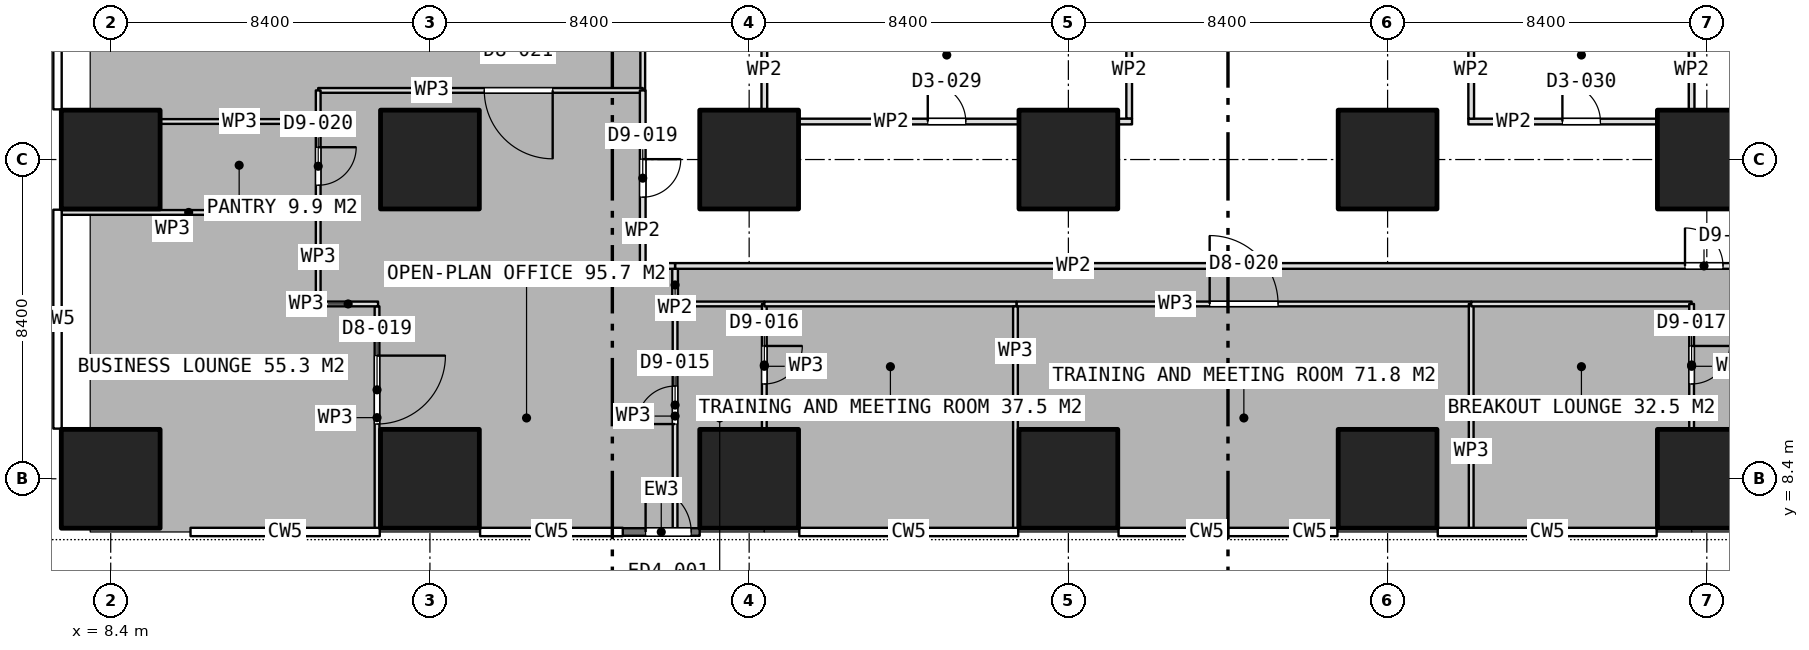
"""IFC4 building model, lengths in metres.
Left out: names, types, materials, properties, quantities, classifications, styles, units other than length and angle.
Written with IfcOpenShell. Run it as: python <this file> out.ifc"""

import sys

from ifc_helpers import new_model, si_unit, direction, frame, frame_2d, origin, origin_2d, place, context, subcontext, project, spatial, rectangle, extrude, element, fill, save


model = new_model("IFC4")
c1 = context("Model", 3, precision=1e-05, world=origin(), true_north=direction((0.0, 1.0)))
c2 = subcontext(c1, "Body", "Model", "MODEL_VIEW")
j1 = project(units=[si_unit("LENGTHUNIT", "METRE"), si_unit("PLANEANGLEUNIT", "RADIAN")], contexts=[c1])
p1 = place(None, origin())
s1 = spatial("IfcSite", under=j1, at=p1, CompositionType="ELEMENT")
p2 = place(p1, origin())
s2 = spatial("IfcBuilding", under=s1, at=p2, CompositionType="ELEMENT")
p3 = place(p2, frame((0.0, 0.0, 25.4)))
s3 = spatial("IfcBuildingStorey", under=s2, at=p3, CompositionType="ELEMENT", Elevation=25.4)
for number, where, z_axis, x_axis in (
    (1, (8.4, 8.4, 0.0), (0.0, 0.0, 1.0), (1.0, 0.0, 0.0)),
    (2, (8.4, 16.8, 0.0), (0.0, 0.0, 1.0), (1.0, 0.0, 0.0)),
    (3, (16.8, 8.4, 0.0), (0.0, 0.0, 1.0), (1.0, 0.0, 0.0)),
    (4, (16.8, 16.8, 0.0), (0.0, 0.0, 1.0), (1.0, 0.0, 0.0)),
    (5, (25.2, 8.4, 0.0), (0.0, 0.0, 1.0), (1.0, 0.0, 0.0)),
    (6, (25.2, 16.8, 0.0), (0.0, 0.0, 1.0), (1.0, 0.0, 0.0)),
    (7, (33.6, 8.4, 0.0), (0.0, 0.0, 1.0), (1.0, 0.0, 0.0)),
    (8, (33.6, 16.8, 0.0), (0.0, 0.0, 1.0), (1.0, 0.0, 0.0)),
    (9, (42.0, 8.4, 0.0), (0.0, 0.0, 1.0), (1.0, 0.0, 0.0)),
    (10, (42.0, 16.8, 0.0), (0.0, 0.0, 1.0), (1.0, 0.0, 0.0)),
    (11, (50.4, 8.4, 0.0), (0.0, 0.0, 1.0), (1.0, 0.0, 0.0)),
    (12, (50.4, 16.8, 0.0), (0.0, 0.0, 1.0), (1.0, 0.0, 0.0)),
):
    element("IfcColumn", number, at=place(p3, frame(where, z_axis=z_axis, x_axis=x_axis)), inside=s3, PredefinedType="COLUMN", context=c2, shape_type="SweptSolid", body=[
        extrude(rectangle(XDim=2.6, YDim=2.6, at=origin_2d()), origin(), (0.0, 0.0, 1.0), 3.75),
    ])
p4 = place(p3, frame((21.875, 7.0, 0.0), z_axis=(0.0, 0.0, 1.0), x_axis=(1.0, 0.0, 0.0)))
e13 = element("IfcWall", 13, at=p4, inside=s3, PredefinedType="SOLIDWALL", context=c2, shape_type="SweptSolid", body=[
    extrude(rectangle(XDim=2.024, YDim=0.2, at=frame_2d((1.012, 0.0))), origin(), (0.0, 0.0, 1.0), 3.5),
])
p5 = place(p4, frame((0.6, 0.0, 0.0)))
e14 = element("IfcOpeningElement", 14, at=p5, cuts=e13, PredefinedType="OPENING", context=c2, shape_type="SweptSolid", body=[
    extrude(rectangle(XDim=1.2, YDim=2.4, at=frame_2d((0.6, 1.2))), frame((0.0, 0.11, 0.0), z_axis=(0.0, -1.0, 0.0), x_axis=(1.0, 0.0, 0.0)), (0.0, 0.0, 1.0), 0.22),
])
p6 = place(p3, frame((25.525, 17.8, 0.0), z_axis=(0.0, 0.0, 1.0), x_axis=(1.0, 0.0, 0.0)))
e15 = element("IfcWall", 15, at=p6, inside=s3, PredefinedType="PARTITIONING", context=c2, shape_type="SweptSolid", body=[
    extrude(rectangle(XDim=9.75, YDim=0.15, at=frame_2d((4.875, 0.0))), origin(), (0.0, 0.0, 1.0), 3.5),
])
p7 = place(p6, frame((4.375, 0.0, 0.0)))
e16 = element("IfcOpeningElement", 16, at=p7, cuts=e15, PredefinedType="OPENING", context=c2, shape_type="SweptSolid", body=[
    extrude(rectangle(XDim=1.0, YDim=2.1, at=frame_2d((0.5, 1.05))), frame((0.0, 0.085, 0.0), z_axis=(0.0, -1.0, 0.0), x_axis=(1.0, 0.0, 0.0)), (0.0, 0.0, 1.0), 0.17),
])
for number, where, z_axis, x_axis in (
    (17, (25.6, 17.875, 0.0), (0.0, 0.0, 1.0), (0.0, 1.0, 0.0)),
    (18, (35.2, 17.875, 0.0), (0.0, 0.0, 1.0), (0.0, 1.0, 0.0)),
):
    element("IfcWall", number, at=place(p3, frame(where, z_axis=z_axis, x_axis=x_axis)), inside=s3, PredefinedType="PARTITIONING", context=c2, shape_type="SweptSolid", body=[
        extrude(rectangle(XDim=2.575, YDim=0.15, at=frame_2d((1.288, 0.0))), origin(), (0.0, 0.0, 1.0), 3.5),
    ])
p8 = place(p3, frame((44.125, 17.8, 0.0), z_axis=(0.0, 0.0, 1.0), x_axis=(1.0, 0.0, 0.0)))
e19 = element("IfcWall", 19, at=p8, inside=s3, PredefinedType="PARTITIONING", context=c2, shape_type="SweptSolid", body=[
    extrude(rectangle(XDim=5.95, YDim=0.15, at=frame_2d((2.975, 0.0))), origin(), (0.0, 0.0, 1.0), 3.5),
])
p9 = place(p8, frame((2.475, 0.0, 0.0)))
e20 = element("IfcOpeningElement", 20, at=p9, cuts=e19, PredefinedType="OPENING", context=c2, shape_type="SweptSolid", body=[
    extrude(rectangle(XDim=1.0, YDim=2.1, at=frame_2d((0.5, 1.05))), frame((0.0, 0.085, 0.0), z_axis=(0.0, -1.0, 0.0), x_axis=(1.0, 0.0, 0.0)), (0.0, 0.0, 1.0), 0.17),
])
for number, where, z_axis, x_axis in (
    (21, (44.2, 17.875, 0.0), (0.0, 0.0, 1.0), (0.0, 1.0, 0.0)),
    (22, (50.0, 17.875, 0.0), (0.0, 0.0, 1.0), (0.0, 1.0, 0.0)),
):
    element("IfcWall", number, at=place(p3, frame(where, z_axis=z_axis, x_axis=x_axis)), inside=s3, PredefinedType="PARTITIONING", context=c2, shape_type="SweptSolid", body=[
        extrude(rectangle(XDim=2.575, YDim=0.15, at=frame_2d((1.288, 0.0))), origin(), (0.0, 0.0, 1.0), 3.5),
    ])
p10 = place(p3, frame((32.236, 13.0, 0.0), z_axis=(0.0, 0.0, 1.0), x_axis=(1.0, 0.0, 0.0)))
e23 = element("IfcWall", 23, at=p10, inside=s3, PredefinedType="PARTITIONING", context=c2, shape_type="SweptSolid", body=[
    extrude(rectangle(XDim=11.964, YDim=0.125, at=frame_2d((5.982, 0.0))), origin(), (0.0, 0.0, 1.0), 3.5),
])
p11 = place(p10, frame((5.082, 0.0, 0.0)))
e24 = element("IfcOpeningElement", 24, at=p11, cuts=e23, PredefinedType="OPENING", context=c2, shape_type="SweptSolid", body=[
    extrude(rectangle(XDim=1.8, YDim=2.1, at=frame_2d((0.9, 1.05))), frame((0.0, 0.073, 0.0), z_axis=(0.0, -1.0, 0.0), x_axis=(1.0, 0.0, 0.0)), (0.0, 0.0, 1.0), 0.145),
])
p12 = place(p3, frame((44.2, 13.0, 0.0), z_axis=(0.0, 0.0, 1.0), x_axis=(0.0, -1.0, 0.0)))
e25 = element("IfcWall", 25, at=p12, inside=s3, PredefinedType="PARTITIONING", context=c2, shape_type="SweptSolid", body=[
    extrude(rectangle(XDim=5.95, YDim=0.125, at=frame_2d((2.975, 0.0))), origin(), (0.0, 0.0, 1.0), 3.5),
])
p13 = place(p3, frame((32.208, 7.08, 0.0), z_axis=(0.0, 0.0, 1.0), x_axis=(0.0, 1.0, 0.0)))
e26 = element("IfcWall", 26, at=p13, inside=s3, PredefinedType="PARTITIONING", context=c2, shape_type="SweptSolid", body=[
    extrude(rectangle(XDim=5.858, YDim=0.125, at=frame_2d((2.929, 0.0))), origin(), (0.0, 0.0, 1.0), 3.5),
])
p14 = place(p3, frame((44.201, 13.0, 0.0), z_axis=(0.0, 0.0, 1.0), x_axis=(1.0, 0.0, 0.0)))
e27 = element("IfcWall", 27, at=p14, inside=s3, PredefinedType="PARTITIONING", context=c2, shape_type="SweptSolid", body=[
    extrude(rectangle(XDim=5.799, YDim=0.125, at=frame_2d((2.899, 0.0))), origin(), (0.0, 0.0, 1.0), 3.5),
])
p15 = place(p3, frame((50.0, 13.0, 0.0), z_axis=(0.0, 0.0, 1.0), x_axis=(0.0, -1.0, 0.0)))
e28 = element("IfcWall", 28, at=p15, inside=s3, PredefinedType="PARTITIONING", context=c2, shape_type="SweptSolid", body=[
    extrude(rectangle(XDim=3.28, YDim=0.125, at=frame_2d((1.64, 0.0))), origin(), (0.0, 0.0, 1.0), 3.5),
])
p16 = place(p15, frame((1.105, 0.0, 0.0)))
e29 = element("IfcOpeningElement", 29, at=p16, cuts=e28, PredefinedType="OPENING", context=c2, shape_type="SweptSolid", body=[
    extrude(rectangle(XDim=1.0, YDim=2.1, at=frame_2d((0.5, 1.05))), frame((0.0, 0.073, 0.0), z_axis=(0.0, -1.0, 0.0), x_axis=(1.0, 0.0, 0.0)), (0.0, 0.0, 1.0), 0.145),
])
p17 = place(p3, frame((23.251, 13.0, 0.0), z_axis=(0.0, 0.0, 1.0), x_axis=(1.0, 0.0, 0.0)))
e30 = element("IfcWall", 30, at=p17, inside=s3, PredefinedType="PARTITIONING", context=c2, shape_type="SweptSolid", body=[
    extrude(rectangle(XDim=2.348, YDim=0.125, at=frame_2d((1.174, 0.0))), origin(), (0.0, 0.0, 1.0), 3.5),
])
p18 = place(p3, frame((25.599, 13.0, 0.0), z_axis=(0.0, 0.0, 1.0), x_axis=(0.0, -1.0, 0.0)))
e31 = element("IfcWall", 31, at=p18, inside=s3, PredefinedType="PARTITIONING", context=c2, shape_type="SweptSolid", body=[
    extrude(rectangle(XDim=3.28, YDim=0.125, at=frame_2d((1.64, 0.0))), origin(), (0.0, 0.0, 1.0), 3.5),
])
p19 = place(p18, frame((1.105, 0.0, 0.0)))
e32 = element("IfcOpeningElement", 32, at=p19, cuts=e31, PredefinedType="OPENING", context=c2, shape_type="SweptSolid", body=[
    extrude(rectangle(XDim=1.0, YDim=2.1, at=frame_2d((0.5, 1.05))), frame((0.0, 0.073, 0.0), z_axis=(0.0, -1.0, 0.0), x_axis=(1.0, 0.0, 0.0)), (0.0, 0.0, 1.0), 0.145),
])
p20 = place(p3, frame((23.251, 7.1, 0.0), z_axis=(0.0, 0.0, 1.0), x_axis=(0.0, 1.0, 0.0)))
e33 = element("IfcWall", 33, at=p20, inside=s3, PredefinedType="PARTITIONING", context=c2, shape_type="SweptSolid", body=[
    extrude(rectangle(XDim=5.9, YDim=0.125, at=frame_2d((2.95, 0.0))), origin(), (0.0, 0.0, 1.0), 3.5),
])
p21 = place(p20, frame((2.74, 0.0, 0.0)))
e34 = element("IfcOpeningElement", 34, at=p21, cuts=e33, PredefinedType="OPENING", context=c2, shape_type="SweptSolid", body=[
    extrude(rectangle(XDim=1.0, YDim=2.1, at=frame_2d((0.5, 1.05))), frame((0.0, 0.073, 0.0), z_axis=(0.0, -1.0, 0.0), x_axis=(1.0, 0.0, 0.0)), (0.0, 0.0, 1.0), 0.145),
])
p22 = place(p3, frame((25.6, 13.0, 0.0), z_axis=(0.0, 0.0, 1.0), x_axis=(1.0, 0.0, 0.0)))
e35 = element("IfcWall", 35, at=p22, inside=s3, PredefinedType="PARTITIONING", context=c2, shape_type="SweptSolid", body=[
    extrude(rectangle(XDim=6.634, YDim=0.125, at=frame_2d((3.317, 0.0))), origin(), (0.0, 0.0, 1.0), 3.5),
])
p23 = place(p3, frame((23.251, 13.0, 0.0), z_axis=(0.0, 0.0, 1.0), x_axis=(0.0, 1.0, 0.0)))
e36 = element("IfcWall", 36, at=p23, inside=s3, PredefinedType="PARTITIONING", context=c2, shape_type="SweptSolid", body=[
    extrude(rectangle(XDim=1.0, YDim=0.15, at=frame_2d((0.5, 0.0))), origin(), (0.0, 0.0, 1.0), 3.5),
])
p24 = place(p3, frame((23.251, 14.0, 0.0), z_axis=(0.0, 0.0, 1.0), x_axis=(1.0, 0.0, 0.0)))
e37 = element("IfcWall", 37, at=p24, inside=s3, PredefinedType="PARTITIONING", context=c2, shape_type="SweptSolid", body=[
    extrude(rectangle(XDim=29.949, YDim=0.15, at=frame_2d((14.975, 0.0))), origin(), (0.0, 0.0, 1.0), 3.5),
])
p25 = place(p24, frame((26.575, 0.0, 0.0)))
e38 = element("IfcOpeningElement", 38, at=p25, cuts=e37, PredefinedType="OPENING", context=c2, shape_type="SweptSolid", body=[
    extrude(rectangle(XDim=1.0, YDim=2.1, at=frame_2d((0.5, 1.05))), frame((0.0, 0.085, 0.0), z_axis=(0.0, -1.0, 0.0), x_axis=(1.0, 0.0, 0.0)), (0.0, 0.0, 1.0), 0.17),
])
p26 = place(p3, frame((13.86, 17.801, 0.0), z_axis=(0.0, 0.0, 1.0), x_axis=(-1.0, 0.0, 0.0)))
e39 = element("IfcWall", 39, at=p26, inside=s3, PredefinedType="PARTITIONING", context=c2, shape_type="SweptSolid", body=[
    extrude(rectangle(XDim=4.14, YDim=0.125, at=frame_2d((2.07, 0.0))), origin(), (0.0, 0.0, 1.0), 3.5),
])
p27 = place(p3, frame((22.4, 28.189, 0.0), z_axis=(0.0, 0.0, 1.0), x_axis=(0.0, -1.0, 0.0)))
e40 = element("IfcWall", 40, at=p27, inside=s3, PredefinedType="PARTITIONING", context=c2, shape_type="SweptSolid", body=[
    extrude(rectangle(XDim=9.57, YDim=0.125, at=frame_2d((4.785, 0.0))), origin(), (0.0, 0.0, 1.0), 3.5),
])
p28 = place(p3, frame((22.4, 18.619, 0.0), z_axis=(0.0, 0.0, 1.0), x_axis=(-1.0, 0.0, 0.0)))
e41 = element("IfcWall", 41, at=p28, inside=s3, PredefinedType="PARTITIONING", context=c2, shape_type="SweptSolid", body=[
    extrude(rectangle(XDim=8.54, YDim=0.125, at=frame_2d((4.27, 0.0))), origin(), (0.0, 0.0, 1.0), 3.5),
])
p29 = place(p28, frame((2.37, 0.0, 0.0)))
e42 = element("IfcOpeningElement", 42, at=p29, cuts=e41, PredefinedType="OPENING", context=c2, shape_type="SweptSolid", body=[
    extrude(rectangle(XDim=1.8, YDim=2.1, at=frame_2d((0.9, 1.05))), frame((0.0, 0.073, 0.0), z_axis=(0.0, -1.0, 0.0), x_axis=(1.0, 0.0, 0.0)), (0.0, 0.0, 1.0), 0.145),
])
p30 = place(p3, frame((13.86, 18.619, 0.0), z_axis=(0.0, 0.0, 1.0), x_axis=(0.0, -1.0, 0.0)))
e43 = element("IfcWall", 43, at=p30, inside=s3, PredefinedType="PARTITIONING", context=c2, shape_type="SweptSolid", body=[
    extrude(rectangle(XDim=0.818, YDim=0.125, at=frame_2d((0.409, 0.0))), origin(), (0.0, 0.0, 1.0), 3.5),
])
p31 = place(p3, frame((13.86, 17.8, 0.0), z_axis=(0.0, 0.0, 1.0), x_axis=(0.0, -1.0, 0.0)))
e44 = element("IfcWall", 44, at=p31, inside=s3, PredefinedType="PARTITIONING", context=c2, shape_type="SweptSolid", body=[
    extrude(rectangle(XDim=2.352, YDim=0.125, at=frame_2d((1.176, 0.0))), origin(), (0.0, 0.0, 1.0), 3.5),
])
p32 = place(p31, frame((0.676, 0.0, 0.0)))
e45 = element("IfcOpeningElement", 45, at=p32, cuts=e44, PredefinedType="OPENING", context=c2, shape_type="SweptSolid", body=[
    extrude(rectangle(XDim=1.0, YDim=2.1, at=frame_2d((0.5, 1.05))), frame((0.0, 0.073, 0.0), z_axis=(0.0, -1.0, 0.0), x_axis=(1.0, 0.0, 0.0)), (0.0, 0.0, 1.0), 0.145),
])
p33 = place(p3, frame((13.797, 15.408, 0.0), z_axis=(0.0, 0.0, 1.0), x_axis=(-1.0, 0.0, 0.0)))
e46 = element("IfcWall", 46, at=p33, inside=s3, PredefinedType="PARTITIONING", context=c2, shape_type="SweptSolid", body=[
    extrude(rectangle(XDim=6.691, YDim=0.125, at=frame_2d((3.346, 0.0))), origin(), (0.0, 0.0, 1.0), 3.5),
])
p34 = place(p3, frame((15.408, 12.938, 0.0), z_axis=(0.0, 0.0, 1.0), x_axis=(0.0, -1.0, 0.0)))
e47 = element("IfcWall", 47, at=p34, inside=s3, PredefinedType="PARTITIONING", context=c2, shape_type="SweptSolid", body=[
    extrude(rectangle(XDim=5.858, YDim=0.125, at=frame_2d((2.929, 0.0))), origin(), (0.0, 0.0, 1.0), 3.5),
])
p35 = place(p34, frame((1.297, 0.0, 0.0)))
e48 = element("IfcOpeningElement", 48, at=p35, cuts=e47, PredefinedType="OPENING", context=c2, shape_type="SweptSolid", body=[
    extrude(rectangle(XDim=1.8, YDim=2.1, at=frame_2d((0.9, 1.05))), frame((0.0, 0.073, 0.0), z_axis=(0.0, -1.0, 0.0), x_axis=(1.0, 0.0, 0.0)), (0.0, 0.0, 1.0), 0.145),
])
p36 = place(p3, frame((13.86, 15.447, 0.0), z_axis=(0.0, 0.0, 1.0), x_axis=(0.0, -1.0, 0.0)))
e49 = element("IfcWall", 49, at=p36, inside=s3, PredefinedType="PARTITIONING", context=c2, shape_type="SweptSolid", body=[
    extrude(rectangle(XDim=2.447, YDim=0.125, at=frame_2d((1.224, 0.0))), origin(), (0.0, 0.0, 1.0), 3.5),
])
p37 = place(p3, frame((13.86, 13.0, 0.0), z_axis=(0.0, 0.0, 1.0), x_axis=(1.0, 0.0, 0.0)))
e50 = element("IfcWall", 50, at=p37, inside=s3, PredefinedType="PARTITIONING", context=c2, shape_type="SweptSolid", body=[
    extrude(rectangle(XDim=1.575, YDim=0.125, at=frame_2d((0.788, 0.0))), origin(), (0.0, 0.0, 1.0), 3.5),
])
p38 = place(p3, frame((22.4, 18.619, 0.0), z_axis=(0.0, 0.0, 1.0), x_axis=(0.0, -1.0, 0.0)))
e51 = element("IfcWall", 51, at=p38, inside=s3, PredefinedType="PARTITIONING", context=c2, shape_type="SweptSolid", body=[
    extrude(rectangle(XDim=4.619, YDim=0.15, at=frame_2d((2.31, 0.0))), origin(), (0.0, 0.0, 1.0), 3.5),
])
p39 = place(p38, frame((1.809, 0.0, 0.0)))
e52 = element("IfcOpeningElement", 52, at=p39, cuts=e51, PredefinedType="OPENING", context=c2, shape_type="SweptSolid", body=[
    extrude(rectangle(XDim=1.0, YDim=2.1, at=frame_2d((0.5, 1.05))), frame((0.0, 0.085, 0.0), z_axis=(0.0, -1.0, 0.0), x_axis=(1.0, 0.0, 0.0)), (0.0, 0.0, 1.0), 0.17),
])
p40 = place(p3, frame((22.4, 14.0, 0.0), z_axis=(0.0, 0.0, 1.0), x_axis=(1.0, 0.0, 0.0)))
e53 = element("IfcWall", 53, at=p40, inside=s3, PredefinedType="PARTITIONING", context=c2, shape_type="SweptSolid", body=[
    extrude(rectangle(XDim=0.85, YDim=0.15, at=frame_2d((0.425, 0.0))), origin(), (0.0, 0.0, 1.0), 3.5),
])
p41 = place(p5, origin())
e54 = element("IfcDoor", 54, at=p41, inside=s3, OperationType="SINGLE_SWING_LEFT", PredefinedType="DOOR", context=c2, shape_type="SweptSolid", body=[
    extrude(rectangle(XDim=1.2, YDim=2.4, at=frame_2d((0.6, 1.2))), frame((0.0, 0.025, 0.0), z_axis=(0.0, -1.0, 0.0), x_axis=(1.0, 0.0, 0.0)), (0.0, 0.0, 1.0), 0.05),
])
fill(e14, e54)
p42 = place(p7, origin())
e55 = element("IfcDoor", 55, at=p42, inside=s3, OperationType="SINGLE_SWING_LEFT", PredefinedType="DOOR", context=c2, shape_type="SweptSolid", body=[
    extrude(rectangle(XDim=1.0, YDim=2.1, at=frame_2d((0.5, 1.05))), frame((0.0, 0.025, 0.0), z_axis=(0.0, -1.0, 0.0), x_axis=(1.0, 0.0, 0.0)), (0.0, 0.0, 1.0), 0.05),
])
fill(e16, e55)
p43 = place(p9, origin())
e56 = element("IfcDoor", 56, at=p43, inside=s3, OperationType="SINGLE_SWING_LEFT", PredefinedType="DOOR", context=c2, shape_type="SweptSolid", body=[
    extrude(rectangle(XDim=1.0, YDim=2.1, at=frame_2d((0.5, 1.05))), frame((0.0, 0.025, 0.0), z_axis=(0.0, -1.0, 0.0), x_axis=(1.0, 0.0, 0.0)), (0.0, 0.0, 1.0), 0.05),
])
fill(e20, e56)
p44 = place(p11, origin())
e57 = element("IfcDoor", 57, at=p44, inside=s3, OperationType="DOUBLE_DOOR_SINGLE_SWING", PredefinedType="DOOR", context=c2, shape_type="SweptSolid", body=[
    extrude(rectangle(XDim=1.8, YDim=2.1, at=frame_2d((0.9, 1.05))), frame((0.0, 0.025, 0.0), z_axis=(0.0, -1.0, 0.0), x_axis=(1.0, 0.0, 0.0)), (0.0, 0.0, 1.0), 0.05),
])
fill(e24, e57)
p45 = place(p16, origin())
e58 = element("IfcDoor", 58, at=p45, inside=s3, OperationType="SINGLE_SWING_LEFT", PredefinedType="DOOR", context=c2, shape_type="SweptSolid", body=[
    extrude(rectangle(XDim=1.0, YDim=2.1, at=frame_2d((0.5, 1.05))), frame((0.0, 0.025, 0.0), z_axis=(0.0, -1.0, 0.0), x_axis=(1.0, 0.0, 0.0)), (0.0, 0.0, 1.0), 0.05),
])
fill(e29, e58)
p46 = place(p21, origin())
e59 = element("IfcDoor", 59, at=p46, inside=s3, OperationType="SINGLE_SWING_LEFT", PredefinedType="DOOR", context=c2, shape_type="SweptSolid", body=[
    extrude(rectangle(XDim=1.0, YDim=2.1, at=frame_2d((0.5, 1.05))), frame((0.0, 0.025, 0.0), z_axis=(0.0, -1.0, 0.0), x_axis=(1.0, 0.0, 0.0)), (0.0, 0.0, 1.0), 0.05),
])
fill(e34, e59)
p47 = place(p25, origin())
e60 = element("IfcDoor", 60, at=p47, inside=s3, OperationType="SINGLE_SWING_LEFT", PredefinedType="DOOR", context=c2, shape_type="SweptSolid", body=[
    extrude(rectangle(XDim=1.0, YDim=2.1, at=frame_2d((0.5, 1.05))), frame((0.0, 0.025, 0.0), z_axis=(0.0, -1.0, 0.0), x_axis=(1.0, 0.0, 0.0)), (0.0, 0.0, 1.0), 0.05),
])
fill(e38, e60)
p48 = place(p29, origin())
e61 = element("IfcDoor", 61, at=p48, inside=s3, OperationType="DOUBLE_DOOR_SINGLE_SWING", PredefinedType="DOOR", context=c2, shape_type="SweptSolid", body=[
    extrude(rectangle(XDim=1.8, YDim=2.1, at=frame_2d((0.9, 1.05))), frame((0.0, 0.025, 0.0), z_axis=(0.0, -1.0, 0.0), x_axis=(1.0, 0.0, 0.0)), (0.0, 0.0, 1.0), 0.05),
])
fill(e42, e61)
p49 = place(p32, origin())
e62 = element("IfcDoor", 62, at=p49, inside=s3, OperationType="SINGLE_SWING_LEFT", PredefinedType="DOOR", context=c2, shape_type="SweptSolid", body=[
    extrude(rectangle(XDim=1.0, YDim=2.1, at=frame_2d((0.5, 1.05))), frame((0.0, 0.025, 0.0), z_axis=(0.0, -1.0, 0.0), x_axis=(1.0, 0.0, 0.0)), (0.0, 0.0, 1.0), 0.05),
])
fill(e45, e62)
p50 = place(p35, origin())
e63 = element("IfcDoor", 63, at=p50, inside=s3, OperationType="DOUBLE_DOOR_SINGLE_SWING", PredefinedType="DOOR", context=c2, shape_type="SweptSolid", body=[
    extrude(rectangle(XDim=1.8, YDim=2.1, at=frame_2d((0.9, 1.05))), frame((0.0, 0.025, 0.0), z_axis=(0.0, -1.0, 0.0), x_axis=(1.0, 0.0, 0.0)), (0.0, 0.0, 1.0), 0.05),
])
fill(e48, e63)
p51 = place(p39, origin())
e64 = element("IfcDoor", 64, at=p51, inside=s3, OperationType="SINGLE_SWING_LEFT", PredefinedType="DOOR", context=c2, shape_type="SweptSolid", body=[
    extrude(rectangle(XDim=1.0, YDim=2.1, at=frame_2d((0.5, 1.05))), frame((0.0, 0.025, 0.0), z_axis=(0.0, -1.0, 0.0), x_axis=(1.0, 0.0, 0.0)), (0.0, 0.0, 1.0), 0.05),
])
fill(e52, e64)
p52 = place(p19, origin())
e65 = element("IfcDoor", 65, at=p52, inside=s3, OperationType="SINGLE_SWING_LEFT", PredefinedType="DOOR", context=c2, shape_type="SweptSolid", body=[
    extrude(rectangle(XDim=1.0, YDim=2.1, at=frame_2d((0.5, 1.05))), frame((0.0, 0.025, 0.0), z_axis=(0.0, -1.0, 0.0), x_axis=(1.0, 0.0, 0.0)), (0.0, 0.0, 1.0), 0.05),
])
fill(e32, e65)
save(model, sys.argv[1])
